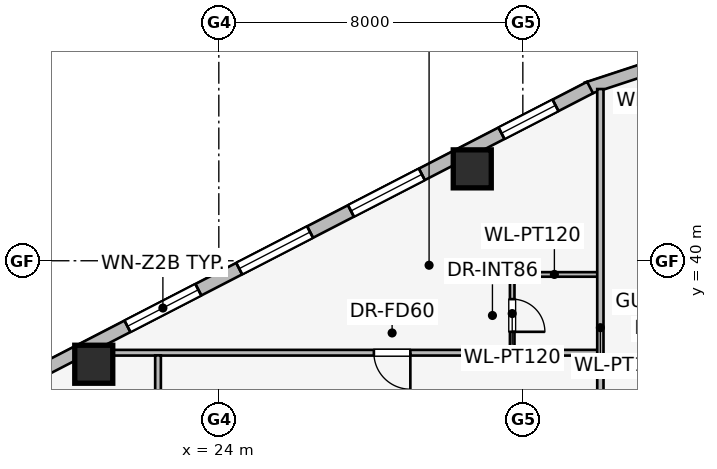
"""IFC4 building model, lengths in metres.
Left out: names, types, materials, properties, quantities, classifications, styles, units other than length and angle.
Written with IfcOpenShell. Run it as: python <this file> out.ifc"""

import sys

from ifc_helpers import new_model, si_unit, direction, frame, frame_2d, origin, origin_2d, place, context, subcontext, project, spatial, rectangle, extrude, element, fill, save


model = new_model("IFC4")
c1 = context("Model", 3, precision=1e-05, world=origin(), true_north=direction((0.0, 1.0)))
c2 = subcontext(c1, "Body", "Model", "MODEL_VIEW")
j1 = project(units=[si_unit("LENGTHUNIT", "METRE"), si_unit("PLANEANGLEUNIT", "RADIAN")], contexts=[c1])
p1 = place(None, origin())
s1 = spatial("IfcSite", under=j1, at=p1, CompositionType="ELEMENT")
p2 = place(p1, origin())
s2 = spatial("IfcBuilding", under=s1, at=p2, CompositionType="ELEMENT")
p3 = place(p2, frame((0.0, 0.0, 118.8)))
s3 = spatial("IfcBuildingStorey", under=s2, at=p3, CompositionType="ELEMENT", Elevation=118.8)
for number, where, z_axis, x_axis in (
    (1, (30.669, 42.418, 0.0), (0.0, 0.0, 1.0), (1.0, 0.0, 0.0)),
    (2, (20.709, 37.277, 0.0), (0.0, 0.0, 1.0), (1.0, 0.0, 0.0)),
):
    element("IfcColumn", number, at=place(p3, frame(where, z_axis=z_axis, x_axis=x_axis)), inside=s3, PredefinedType="COLUMN", context=c2, shape_type="SweptSolid", body=[
        extrude(rectangle(XDim=1.0, YDim=1.0, at=origin_2d()), origin(), (0.0, 0.0, 1.0), 3.45),
    ])
p4 = place(p3, frame((33.681, 44.532, 0.0), z_axis=(0.0, 0.0, 1.0), x_axis=(0.949937416267, 0.312440242569, 0.0)))
e3 = element("IfcWall", 3, at=p4, inside=s3, PredefinedType="STANDARD", context=c2, shape_type="SweptSolid", body=[
    extrude(rectangle(XDim=1.722, YDim=0.33, at=frame_2d((0.861, 0.0))), origin(), (0.0, 0.0, 1.0), 3.19),
])
p5 = place(p3, frame((17.169, 35.99, 0.0), z_axis=(0.0, 0.0, 1.0), x_axis=(0.888613612362, 0.458656568606, 0.0)))
e4 = element("IfcWall", 4, at=p5, inside=s3, PredefinedType="STANDARD", context=c2, shape_type="SweptSolid", body=[
    extrude(rectangle(XDim=18.681, YDim=0.34, at=frame_2d((9.34, 0.0))), origin(), (0.0, 0.0, 1.0), 3.19),
])
p6 = place(p5, frame((1.023, 0.0, 0.75)))
e5 = element("IfcOpeningElement", 5, at=p6, cuts=e4, PredefinedType="OPENING", context=c2, shape_type="SweptSolid", body=[
    extrude(rectangle(XDim=1.6, YDim=1.55, at=frame_2d((0.8, 0.775))), frame((0.0, 0.18, 0.0), z_axis=(0.0, -1.0, 0.0), x_axis=(1.0, 0.0, 0.0)), (0.0, 0.0, 1.0), 0.36),
])
p7 = place(p5, frame((4.981, 0.0, 0.75)))
e6 = element("IfcOpeningElement", 6, at=p7, cuts=e4, PredefinedType="OPENING", context=c2, shape_type="SweptSolid", body=[
    extrude(rectangle(XDim=2.1, YDim=1.5, at=frame_2d((1.05, 0.75))), frame((0.0, 0.18, 0.0), z_axis=(0.0, -1.0, 0.0), x_axis=(1.0, 0.0, 0.0)), (0.0, 0.0, 1.0), 0.36),
])
p8 = place(p5, frame((8.29, 0.0, 0.75)))
e7 = element("IfcOpeningElement", 7, at=p8, cuts=e4, PredefinedType="OPENING", context=c2, shape_type="SweptSolid", body=[
    extrude(rectangle(XDim=2.1, YDim=1.5, at=frame_2d((1.05, 0.75))), frame((0.0, 0.18, 0.0), z_axis=(0.0, -1.0, 0.0), x_axis=(1.0, 0.0, 0.0)), (0.0, 0.0, 1.0), 0.36),
])
p9 = place(p5, frame((11.6, 0.0, 0.75)))
e8 = element("IfcOpeningElement", 8, at=p9, cuts=e4, PredefinedType="OPENING", context=c2, shape_type="SweptSolid", body=[
    extrude(rectangle(XDim=2.1, YDim=1.5, at=frame_2d((1.05, 0.75))), frame((0.0, 0.18, 0.0), z_axis=(0.0, -1.0, 0.0), x_axis=(1.0, 0.0, 0.0)), (0.0, 0.0, 1.0), 0.36),
])
p10 = place(p5, frame((16.058, 0.0, 0.75)))
e9 = element("IfcOpeningElement", 9, at=p10, cuts=e4, PredefinedType="OPENING", context=c2, shape_type="SweptSolid", body=[
    extrude(rectangle(XDim=1.6, YDim=1.55, at=frame_2d((0.8, 0.775))), frame((0.0, 0.18, 0.0), z_axis=(0.0, -1.0, 0.0), x_axis=(1.0, 0.0, 0.0)), (0.0, 0.0, 1.0), 0.36),
])
p11 = place(p3, frame((34.0, 39.64, 0.0), z_axis=(0.0, 0.0, 1.0), x_axis=(-1.0, 0.0, 0.0)))
e10 = element("IfcWall", 10, at=p11, inside=s3, PredefinedType="PARTITIONING", context=c2, shape_type="SweptSolid", body=[
    extrude(rectangle(XDim=2.34, YDim=0.12, at=frame_2d((1.17, 0.0))), origin(), (0.0, 0.0, 1.0), 2.582),
])
p12 = place(p3, frame((31.72, 39.64, 0.0), z_axis=(0.0, 0.0, 1.0), x_axis=(0.0, -1.0, 0.0)))
e11 = element("IfcWall", 11, at=p12, inside=s3, PredefinedType="PARTITIONING", context=c2, shape_type="SweptSolid", body=[
    extrude(rectangle(XDim=2.06, YDim=0.12, at=frame_2d((1.03, 0.0))), origin(), (0.0, 0.0, 1.0), 3.19),
])
p13 = place(p12, frame((0.65, 0.0, 0.0)))
e12 = element("IfcOpeningElement", 12, at=p13, cuts=e11, PredefinedType="OPENING", context=c2, shape_type="SweptSolid", body=[
    extrude(rectangle(XDim=0.86, YDim=2.0, at=frame_2d((0.43, 1.0))), frame((0.0, 0.07, 0.0), z_axis=(0.0, -1.0, 0.0), x_axis=(1.0, 0.0, 0.0)), (0.0, 0.0, 1.0), 0.14),
])
p14 = place(p3, frame((34.0, 37.58, 0.0), z_axis=(0.0, 0.0, 1.0), x_axis=(-1.0, 0.0, 0.0)))
e13 = element("IfcWall", 13, at=p14, inside=s3, PredefinedType="PARTITIONING", context=c2, shape_type="SweptSolid", body=[
    extrude(rectangle(XDim=13.707, YDim=0.15, at=frame_2d((6.854, 0.0))), origin(), (0.0, 0.0, 1.0), 2.657),
])
p15 = place(p14, frame((4.96, 0.0, 0.0)))
e14 = element("IfcOpeningElement", 14, at=p15, cuts=e13, PredefinedType="OPENING", context=c2, shape_type="SweptSolid", body=[
    extrude(rectangle(XDim=0.96, YDim=2.0, at=frame_2d((0.48, 1.0))), frame((0.0, 0.085, 0.0), z_axis=(0.0, -1.0, 0.0), x_axis=(1.0, 0.0, 0.0)), (0.0, 0.0, 1.0), 0.17),
])
p16 = place(p3, frame((34.04, 31.96, 0.0), z_axis=(0.0, 0.0, 1.0), x_axis=(0.0, 1.0, 0.0)))
e15 = element("IfcWall", 15, at=p16, inside=s3, PredefinedType="PARTITIONING", context=c2, shape_type="SweptSolid", body=[
    extrude(rectangle(XDim=12.558, YDim=0.165, at=frame_2d((6.279, 0.0))), origin(), (0.0, 0.0, 1.0), 3.19),
])
p17 = place(p3, frame((22.4, 36.08, 0.0), z_axis=(0.0, 0.0, 1.0), x_axis=(0.0, 1.0, 0.0)))
e16 = element("IfcWall", 16, at=p17, inside=s3, PredefinedType="PARTITIONING", context=c2, shape_type="SweptSolid", body=[
    extrude(rectangle(XDim=1.43, YDim=0.15, at=frame_2d((0.715, 0.0))), origin(), (0.0, 0.0, 1.0), 3.19),
])
p18 = place(p7, origin())
e17 = element("IfcWindow", 17, at=p18, inside=s3, PartitioningType="SINGLE_PANEL", PredefinedType="WINDOW", context=c2, shape_type="SweptSolid", body=[
    extrude(rectangle(XDim=2.1, YDim=1.5, at=frame_2d((1.05, 0.75))), frame((0.0, 0.03, 0.0), z_axis=(0.0, -1.0, 0.0), x_axis=(1.0, 0.0, 0.0)), (0.0, 0.0, 1.0), 0.06),
])
fill(e6, e17)
p19 = place(p8, origin())
e18 = element("IfcWindow", 18, at=p19, inside=s3, PartitioningType="SINGLE_PANEL", PredefinedType="WINDOW", context=c2, shape_type="SweptSolid", body=[
    extrude(rectangle(XDim=2.1, YDim=1.5, at=frame_2d((1.05, 0.75))), frame((0.0, 0.03, 0.0), z_axis=(0.0, -1.0, 0.0), x_axis=(1.0, 0.0, 0.0)), (0.0, 0.0, 1.0), 0.06),
])
fill(e7, e18)
p20 = place(p9, origin())
e19 = element("IfcWindow", 19, at=p20, inside=s3, PartitioningType="SINGLE_PANEL", PredefinedType="WINDOW", context=c2, shape_type="SweptSolid", body=[
    extrude(rectangle(XDim=2.1, YDim=1.5, at=frame_2d((1.05, 0.75))), frame((0.0, 0.03, 0.0), z_axis=(0.0, -1.0, 0.0), x_axis=(1.0, 0.0, 0.0)), (0.0, 0.0, 1.0), 0.06),
])
fill(e8, e19)
p21 = place(p10, origin())
e20 = element("IfcWindow", 20, at=p21, inside=s3, PartitioningType="SINGLE_PANEL", PredefinedType="WINDOW", context=c2, shape_type="SweptSolid", body=[
    extrude(rectangle(XDim=1.6, YDim=1.55, at=frame_2d((0.8, 0.775))), frame((0.0, 0.03, 0.0), z_axis=(0.0, -1.0, 0.0), x_axis=(1.0, 0.0, 0.0)), (0.0, 0.0, 1.0), 0.06),
])
fill(e9, e20)
p22 = place(p13, origin())
e21 = element("IfcDoor", 21, at=p22, inside=s3, OperationType="SINGLE_SWING_RIGHT", PredefinedType="DOOR", context=c2, shape_type="SweptSolid", body=[
    extrude(rectangle(XDim=0.86, YDim=2.0, at=frame_2d((0.43, 1.0))), frame((0.0, 0.025, 0.0), z_axis=(0.0, -1.0, 0.0), x_axis=(1.0, 0.0, 0.0)), (0.0, 0.0, 1.0), 0.05),
])
fill(e12, e21)
p23 = place(p15, origin())
e22 = element("IfcDoor", 22, at=p23, inside=s3, OperationType="SINGLE_SWING_LEFT", PredefinedType="DOOR", context=c2, shape_type="SweptSolid", body=[
    extrude(rectangle(XDim=0.96, YDim=2.0, at=frame_2d((0.48, 1.0))), frame((0.0, 0.025, 0.0), z_axis=(0.0, -1.0, 0.0), x_axis=(1.0, 0.0, 0.0)), (0.0, 0.0, 1.0), 0.05),
])
fill(e14, e22)
save(model, sys.argv[1])
